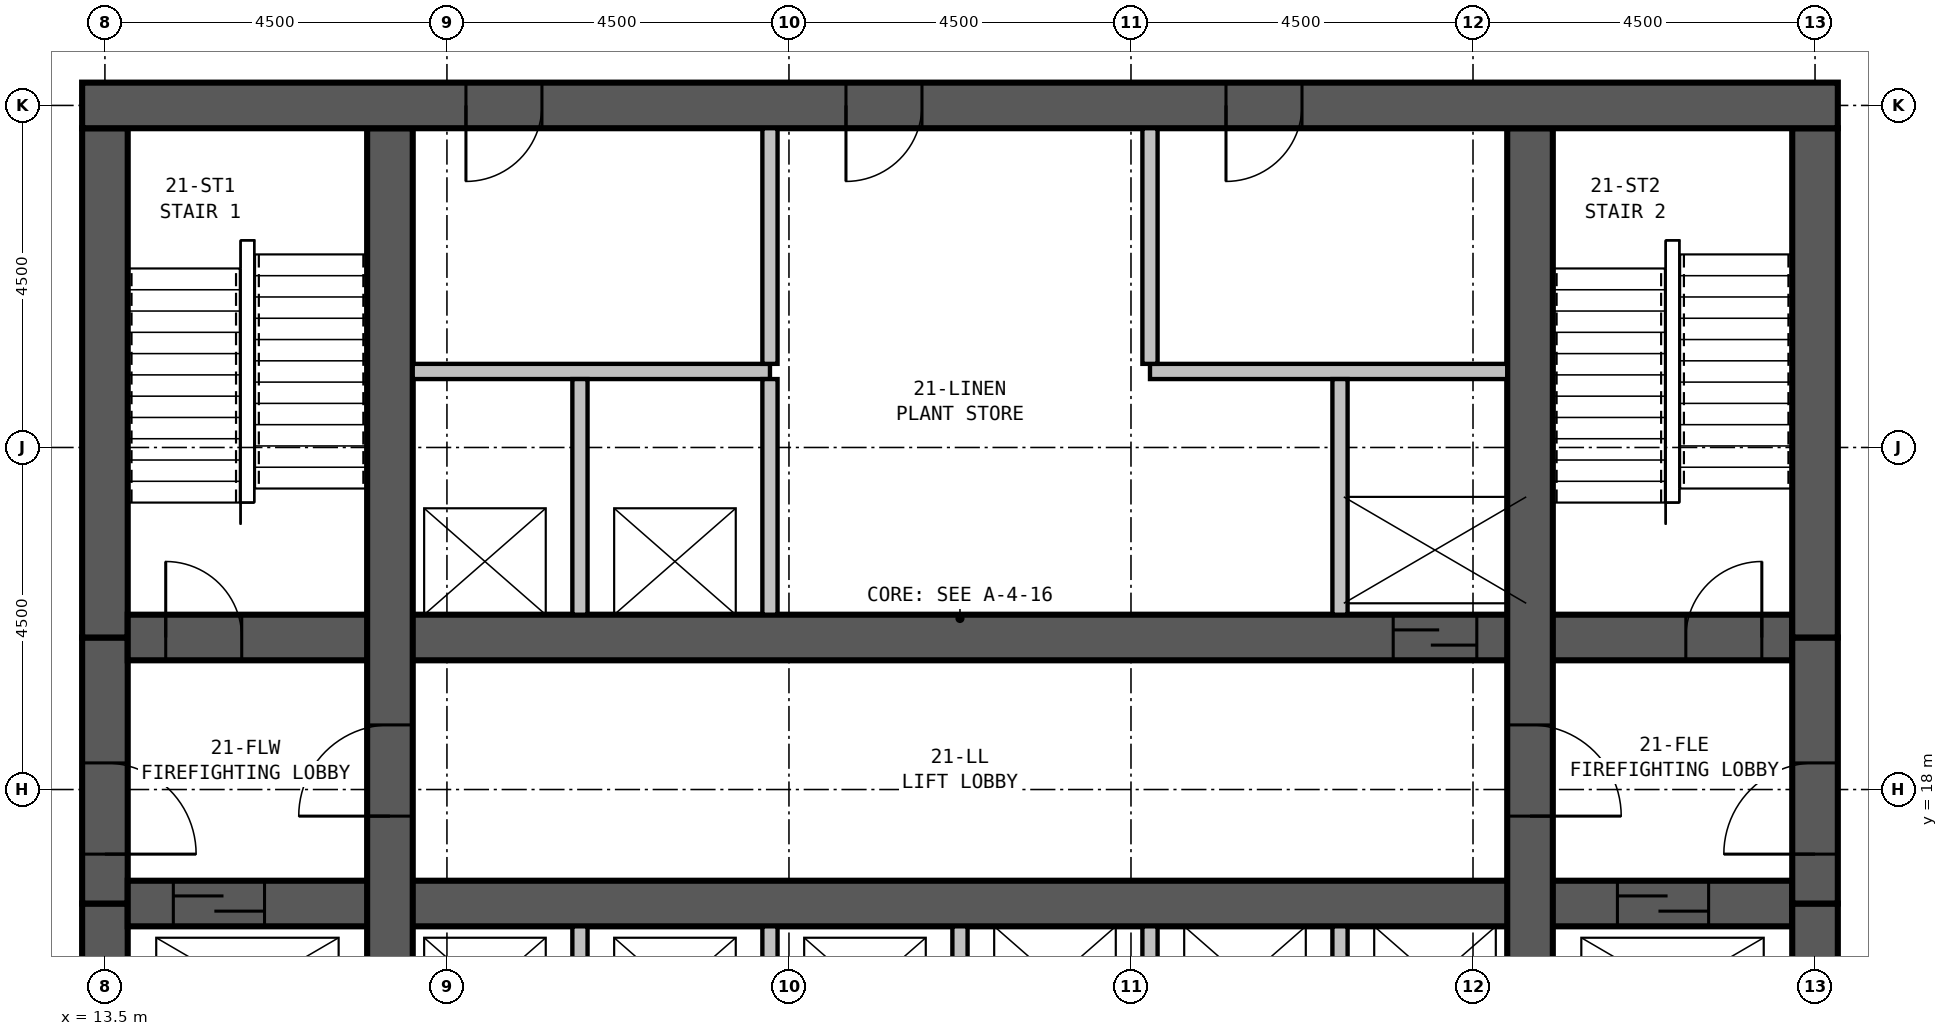
"""IFC4 building model, lengths in metres.
Left out: names, types, materials, properties, quantities, classifications, styles, units other than length and angle.
Written with IfcOpenShell. Run it as: python <this file> out.ifc"""

import sys

from ifc_helpers import new_model, si_unit, direction, frame, frame_2d, origin, place, context, subcontext, project, spatial, rectangle, extrude, element, fill, save


model = new_model("IFC4")
c1 = context("Model", 3, precision=1e-05, world=origin(), true_north=direction((0.0, 1.0)))
c2 = subcontext(c1, "Body", "Model", "MODEL_VIEW")
j1 = project(units=[si_unit("LENGTHUNIT", "METRE"), si_unit("PLANEANGLEUNIT", "RADIAN")], contexts=[c1])
p1 = place(None, origin())
s1 = spatial("IfcSite", under=j1, at=p1, CompositionType="ELEMENT")
p2 = place(p1, origin())
s2 = spatial("IfcBuilding", under=s1, at=p2, CompositionType="ELEMENT")
p3 = place(p2, frame((0.0, 0.0, 85.7)))
s3 = spatial("IfcBuildingStorey", under=s2, at=p3, CompositionType="ELEMENT", Elevation=85.7)
p4 = place(p3, frame((36.3, 27.0, 0.0), z_axis=(0.0, 0.0, 1.0), x_axis=(-1.0, 0.0, 0.0)))
e1 = element("IfcWall", 1, at=p4, inside=s3, PredefinedType="SHEAR", context=c2, shape_type="SweptSolid", body=[
    extrude(rectangle(XDim=23.1, YDim=0.6, at=frame_2d((11.55, 0.0))), origin(), (0.0, 0.0, 1.0), 4.2),
])
p5 = place(p4, frame((17.05, 0.0, 0.0)))
e2 = element("IfcOpeningElement", 2, at=p5, cuts=e1, PredefinedType="OPENING", context=c2, shape_type="SweptSolid", body=[
    extrude(rectangle(XDim=1.0, YDim=2.1, at=frame_2d((0.5, 1.05))), frame((0.0, 0.31, 0.0), z_axis=(0.0, -1.0, 0.0), x_axis=(1.0, 0.0, 0.0)), (0.0, 0.0, 1.0), 0.62),
])
p6 = place(p4, frame((12.05, 0.0, 0.0)))
e3 = element("IfcOpeningElement", 3, at=p6, cuts=e1, PredefinedType="OPENING", context=c2, shape_type="SweptSolid", body=[
    extrude(rectangle(XDim=1.0, YDim=2.1, at=frame_2d((0.5, 1.05))), frame((0.0, 0.31, 0.0), z_axis=(0.0, -1.0, 0.0), x_axis=(1.0, 0.0, 0.0)), (0.0, 0.0, 1.0), 0.62),
])
p7 = place(p4, frame((7.05, 0.0, 0.0)))
e4 = element("IfcOpeningElement", 4, at=p7, cuts=e1, PredefinedType="OPENING", context=c2, shape_type="SweptSolid", body=[
    extrude(rectangle(XDim=1.0, YDim=2.1, at=frame_2d((0.5, 1.05))), frame((0.0, 0.31, 0.0), z_axis=(0.0, -1.0, 0.0), x_axis=(1.0, 0.0, 0.0)), (0.0, 0.0, 1.0), 0.62),
])
p8 = place(p3, frame((17.25, 13.8, 0.0), z_axis=(0.0, 0.0, 1.0), x_axis=(0.0, 1.0, 0.0)))
e5 = element("IfcWall", 5, at=p8, inside=s3, PredefinedType="SHEAR", context=c2, shape_type="SweptSolid", body=[
    extrude(rectangle(XDim=12.9, YDim=0.6, at=frame_2d((6.45, 0.0))), origin(), (0.0, 0.0, 1.0), 4.2),
])
p9 = place(p8, frame((3.85, 0.0, 0.0)))
e6 = element("IfcOpeningElement", 6, at=p9, cuts=e5, PredefinedType="OPENING", context=c2, shape_type="SweptSolid", body=[
    extrude(rectangle(XDim=1.2, YDim=2.1, at=frame_2d((0.6, 1.05))), frame((0.0, 0.31, 0.0), z_axis=(0.0, -1.0, 0.0), x_axis=(1.0, 0.0, 0.0)), (0.0, 0.0, 1.0), 0.62),
])
p10 = place(p3, frame((32.25, 13.8, 0.0), z_axis=(0.0, 0.0, 1.0), x_axis=(0.0, 1.0, 0.0)))
e7 = element("IfcWall", 7, at=p10, inside=s3, PredefinedType="SHEAR", context=c2, shape_type="SweptSolid", body=[
    extrude(rectangle(XDim=12.9, YDim=0.6, at=frame_2d((6.45, 0.0))), origin(), (0.0, 0.0, 1.0), 4.2),
])
p11 = place(p10, frame((5.05, 0.0, 0.0), z_axis=(0.0, 0.0, 1.0), x_axis=(-1.0, 0.0, 0.0)))
e8 = element("IfcOpeningElement", 8, at=p11, cuts=e7, PredefinedType="OPENING", context=c2, shape_type="SweptSolid", body=[
    extrude(rectangle(XDim=1.2, YDim=2.1, at=frame_2d((0.6, 1.05))), frame((0.0, 0.31, 0.0), z_axis=(0.0, -1.0, 0.0), x_axis=(1.0, 0.0, 0.0)), (0.0, 0.0, 1.0), 0.62),
])
p12 = place(p3, frame((13.8, 16.5, 0.0), z_axis=(0.0, 0.0, 1.0), x_axis=(1.0, 0.0, 0.0)))
e9 = element("IfcWall", 9, at=p12, inside=s3, PredefinedType="SHEAR", context=c2, shape_type="SweptSolid", body=[
    extrude(rectangle(XDim=21.9, YDim=0.6, at=frame_2d((10.95, 0.0))), origin(), (0.0, 0.0, 1.0), 4.2),
])
p13 = place(p12, frame((0.6, 0.0, 0.0)))
e10 = element("IfcOpeningElement", 10, at=p13, cuts=e9, PredefinedType="OPENING", context=c2, shape_type="SweptSolid", body=[
    extrude(rectangle(XDim=1.2, YDim=2.1, at=frame_2d((0.6, 1.05))), frame((0.0, 0.31, 0.0), z_axis=(0.0, -1.0, 0.0), x_axis=(1.0, 0.0, 0.0)), (0.0, 0.0, 1.0), 0.62),
])
p14 = place(p12, frame((19.6, 0.0, 0.0)))
e11 = element("IfcOpeningElement", 11, at=p14, cuts=e9, PredefinedType="OPENING", context=c2, shape_type="SweptSolid", body=[
    extrude(rectangle(XDim=1.2, YDim=2.1, at=frame_2d((0.6, 1.05))), frame((0.0, 0.31, 0.0), z_axis=(0.0, -1.0, 0.0), x_axis=(1.0, 0.0, 0.0)), (0.0, 0.0, 1.0), 0.62),
])
p15 = place(p3, frame((13.8, 20.0, 0.0), z_axis=(0.0, 0.0, 1.0), x_axis=(1.0, 0.0, 0.0)))
e12 = element("IfcWall", 12, at=p15, inside=s3, PredefinedType="SHEAR", context=c2, shape_type="SweptSolid", body=[
    extrude(rectangle(XDim=21.9, YDim=0.6, at=frame_2d((10.95, 0.0))), origin(), (0.0, 0.0, 1.0), 4.2),
])
p16 = place(p15, frame((0.5, 0.0, 0.0)))
e13 = element("IfcOpeningElement", 13, at=p16, cuts=e12, PredefinedType="OPENING", context=c2, shape_type="SweptSolid", body=[
    extrude(rectangle(XDim=1.0, YDim=2.1, at=frame_2d((0.5, 1.05))), frame((0.0, 0.31, 0.0), z_axis=(0.0, -1.0, 0.0), x_axis=(1.0, 0.0, 0.0)), (0.0, 0.0, 1.0), 0.62),
])
p17 = place(p15, frame((20.5, 0.0, 0.0)))
e14 = element("IfcOpeningElement", 14, at=p17, cuts=e12, PredefinedType="OPENING", context=c2, shape_type="SweptSolid", body=[
    extrude(rectangle(XDim=1.0, YDim=2.1, at=frame_2d((0.5, 1.05))), frame((0.0, 0.31, 0.0), z_axis=(0.0, -1.0, 0.0), x_axis=(1.0, 0.0, 0.0)), (0.0, 0.0, 1.0), 0.62),
])
p18 = place(p15, frame((16.65, 0.0, 0.0)))
e15 = element("IfcOpeningElement", 15, at=p18, cuts=e12, PredefinedType="OPENING", context=c2, shape_type="SweptSolid", body=[
    extrude(rectangle(XDim=1.1, YDim=2.1, at=frame_2d((0.55, 1.05))), frame((0.0, 0.31, 0.0), z_axis=(0.0, -1.0, 0.0), x_axis=(1.0, 0.0, 0.0)), (0.0, 0.0, 1.0), 0.62),
])
p19 = place(p3, frame((13.5, 26.7, 0.0), z_axis=(0.0, 0.0, 1.0), x_axis=(0.0, -1.0, 0.0)))
e16 = element("IfcWall", 16, at=p19, inside=s3, PredefinedType="SHEAR", context=c2, shape_type="SweptSolid", body=[
    extrude(rectangle(XDim=6.7, YDim=0.6, at=frame_2d((3.35, 0.0))), origin(), (0.0, 0.0, 1.0), 4.2),
])
p20 = place(p3, frame((13.5, 20.0, 0.0), z_axis=(0.0, 0.0, 1.0), x_axis=(0.0, -1.0, 0.0)))
e17 = element("IfcWall", 17, at=p20, inside=s3, PredefinedType="SHEAR", context=c2, shape_type="SweptSolid", body=[
    extrude(rectangle(XDim=3.5, YDim=0.6, at=frame_2d((1.75, 0.0))), origin(), (0.0, 0.0, 1.0), 4.2),
])
p21 = place(p20, frame((1.65, 0.0, 0.0)))
e18 = element("IfcOpeningElement", 18, at=p21, cuts=e17, PredefinedType="OPENING", context=c2, shape_type="SweptSolid", body=[
    extrude(rectangle(XDim=1.2, YDim=2.1, at=frame_2d((0.6, 1.05))), frame((0.0, 0.31, 0.0), z_axis=(0.0, -1.0, 0.0), x_axis=(1.0, 0.0, 0.0)), (0.0, 0.0, 1.0), 0.62),
])
for number, where, z_axis, x_axis in (
    (19, (13.5, 16.5, 0.0), (0.0, 0.0, 1.0), (0.0, -1.0, 0.0)),
    (20, (36.0, 13.8, 0.0), (0.0, 0.0, 1.0), (0.0, 1.0, 0.0)),
):
    element("IfcWall", number, at=place(p3, frame(where, z_axis=z_axis, x_axis=x_axis)), inside=s3, PredefinedType="SHEAR", context=c2, shape_type="SweptSolid", body=[
        extrude(rectangle(XDim=2.7, YDim=0.6, at=frame_2d((1.35, 0.0))), origin(), (0.0, 0.0, 1.0), 4.2),
    ])
p22 = place(p3, frame((36.0, 16.5, 0.0), z_axis=(0.0, 0.0, 1.0), x_axis=(0.0, 1.0, 0.0)))
e21 = element("IfcWall", 21, at=p22, inside=s3, PredefinedType="SHEAR", context=c2, shape_type="SweptSolid", body=[
    extrude(rectangle(XDim=3.5, YDim=0.6, at=frame_2d((1.75, 0.0))), origin(), (0.0, 0.0, 1.0), 4.2),
])
p23 = place(p22, frame((0.65, 0.0, 0.0)))
e22 = element("IfcOpeningElement", 22, at=p23, cuts=e21, PredefinedType="OPENING", context=c2, shape_type="SweptSolid", body=[
    extrude(rectangle(XDim=1.2, YDim=2.1, at=frame_2d((0.6, 1.05))), frame((0.0, 0.31, 0.0), z_axis=(0.0, -1.0, 0.0), x_axis=(1.0, 0.0, 0.0)), (0.0, 0.0, 1.0), 0.62),
])
p24 = place(p3, frame((36.0, 20.0, 0.0), z_axis=(0.0, 0.0, 1.0), x_axis=(0.0, 1.0, 0.0)))
e23 = element("IfcWall", 23, at=p24, inside=s3, PredefinedType="SHEAR", context=c2, shape_type="SweptSolid", body=[
    extrude(rectangle(XDim=6.7, YDim=0.6, at=frame_2d((3.35, 0.0))), origin(), (0.0, 0.0, 1.0), 4.2),
])
p25 = place(p3, frame((19.75, 13.8, 0.0), z_axis=(0.0, 0.0, 1.0), x_axis=(0.0, 1.0, 0.0)))
e24 = element("IfcWall", 24, at=p25, inside=s3, PredefinedType="PARTITIONING", context=c2, shape_type="SweptSolid", body=[
    extrude(rectangle(XDim=2.4, YDim=0.2, at=frame_2d((1.2, 0.0))), origin(), (0.0, 0.0, 1.0), 3.95),
])
p26 = place(p3, frame((19.75, 20.3, 0.0), z_axis=(0.0, 0.0, 1.0), x_axis=(0.0, 1.0, 0.0)))
e25 = element("IfcWall", 25, at=p26, inside=s3, PredefinedType="PARTITIONING", context=c2, shape_type="SweptSolid", body=[
    extrude(rectangle(XDim=3.1, YDim=0.2, at=frame_2d((1.55, 0.0))), origin(), (0.0, 0.0, 1.0), 3.95),
])
p27 = place(p3, frame((22.25, 13.8, 0.0), z_axis=(0.0, 0.0, 1.0), x_axis=(0.0, 1.0, 0.0)))
e26 = element("IfcWall", 26, at=p27, inside=s3, PredefinedType="PARTITIONING", context=c2, shape_type="SweptSolid", body=[
    extrude(rectangle(XDim=2.4, YDim=0.2, at=frame_2d((1.2, 0.0))), origin(), (0.0, 0.0, 1.0), 3.95),
])
p28 = place(p3, frame((22.25, 20.3, 0.0), z_axis=(0.0, 0.0, 1.0), x_axis=(0.0, 1.0, 0.0)))
e27 = element("IfcWall", 27, at=p28, inside=s3, PredefinedType="PARTITIONING", context=c2, shape_type="SweptSolid", body=[
    extrude(rectangle(XDim=3.1, YDim=0.2, at=frame_2d((1.55, 0.0))), origin(), (0.0, 0.0, 1.0), 3.95),
])
for number, where, z_axis, x_axis in (
    (28, (24.75, 13.8, 0.0), (0.0, 0.0, 1.0), (0.0, 1.0, 0.0)),
    (29, (27.25, 13.8, 0.0), (0.0, 0.0, 1.0), (0.0, 1.0, 0.0)),
    (30, (29.75, 13.8, 0.0), (0.0, 0.0, 1.0), (0.0, 1.0, 0.0)),
):
    element("IfcWall", number, at=place(p3, frame(where, z_axis=z_axis, x_axis=x_axis)), inside=s3, PredefinedType="PARTITIONING", context=c2, shape_type="SweptSolid", body=[
        extrude(rectangle(XDim=2.4, YDim=0.2, at=frame_2d((1.2, 0.0))), origin(), (0.0, 0.0, 1.0), 3.95),
    ])
p29 = place(p3, frame((29.75, 20.3, 0.0), z_axis=(0.0, 0.0, 1.0), x_axis=(0.0, 1.0, 0.0)))
e31 = element("IfcWall", 31, at=p29, inside=s3, PredefinedType="PARTITIONING", context=c2, shape_type="SweptSolid", body=[
    extrude(rectangle(XDim=3.1, YDim=0.2, at=frame_2d((1.55, 0.0))), origin(), (0.0, 0.0, 1.0), 3.95),
])
for number, where, z_axis, x_axis in (
    (32, (17.55, 23.5, 0.0), (0.0, 0.0, 1.0), (1.0, 0.0, 0.0)),
    (33, (27.25, 23.5, 0.0), (0.0, 0.0, 1.0), (1.0, 0.0, 0.0)),
):
    element("IfcWall", number, at=place(p3, frame(where, z_axis=z_axis, x_axis=x_axis)), inside=s3, PredefinedType="PARTITIONING", context=c2, shape_type="SweptSolid", body=[
        extrude(rectangle(XDim=4.7, YDim=0.2, at=frame_2d((2.35, 0.0))), origin(), (0.0, 0.0, 1.0), 3.95),
    ])
for number, where, z_axis, x_axis in (
    (34, (22.25, 23.6, 0.0), (0.0, 0.0, 1.0), (0.0, 1.0, 0.0)),
    (35, (27.25, 23.6, 0.0), (0.0, 0.0, 1.0), (0.0, 1.0, 0.0)),
):
    element("IfcWall", number, at=place(p3, frame(where, z_axis=z_axis, x_axis=x_axis)), inside=s3, PredefinedType="PARTITIONING", context=c2, shape_type="SweptSolid", body=[
        extrude(rectangle(XDim=3.1, YDim=0.2, at=frame_2d((1.55, 0.0))), origin(), (0.0, 0.0, 1.0), 3.95),
    ])
p30 = place(p21, origin())
e36 = element("IfcDoor", 36, at=p30, inside=s3, OperationType="SINGLE_SWING_RIGHT", PredefinedType="DOOR", context=c2, shape_type="SweptSolid", body=[
    extrude(rectangle(XDim=1.2, YDim=2.1, at=frame_2d((0.6, 1.05))), frame((0.0, 0.3, 0.0), z_axis=(0.0, -1.0, 0.0), x_axis=(1.0, 0.0, 0.0)), (0.0, 0.0, 1.0), 0.6),
])
fill(e18, e36)
p31 = place(p23, origin())
e37 = element("IfcDoor", 37, at=p31, inside=s3, OperationType="SINGLE_SWING_LEFT", PredefinedType="DOOR", context=c2, shape_type="SweptSolid", body=[
    extrude(rectangle(XDim=1.2, YDim=2.1, at=frame_2d((0.6, 1.05))), frame((0.0, 0.3, 0.0), z_axis=(0.0, -1.0, 0.0), x_axis=(1.0, 0.0, 0.0)), (0.0, 0.0, 1.0), 0.6),
])
fill(e22, e37)
p32 = place(p9, origin())
e38 = element("IfcDoor", 38, at=p32, inside=s3, OperationType="SINGLE_SWING_LEFT", PredefinedType="DOOR", context=c2, shape_type="SweptSolid", body=[
    extrude(rectangle(XDim=1.2, YDim=2.1, at=frame_2d((0.6, 1.05))), frame((0.0, 0.3, 0.0), z_axis=(0.0, -1.0, 0.0), x_axis=(1.0, 0.0, 0.0)), (0.0, 0.0, 1.0), 0.6),
])
fill(e6, e38)
p33 = place(p11, origin())
e39 = element("IfcDoor", 39, at=p33, inside=s3, OperationType="SINGLE_SWING_RIGHT", PredefinedType="DOOR", context=c2, shape_type="SweptSolid", body=[
    extrude(rectangle(XDim=1.2, YDim=2.1, at=frame_2d((0.6, 1.05))), frame((0.0, 0.3, 0.0), z_axis=(0.0, -1.0, 0.0), x_axis=(1.0, 0.0, 0.0)), (0.0, 0.0, 1.0), 0.6),
])
fill(e8, e39)
p34 = place(p16, origin())
e40 = element("IfcDoor", 40, at=p34, inside=s3, OperationType="SINGLE_SWING_LEFT", PredefinedType="DOOR", context=c2, shape_type="SweptSolid", body=[
    extrude(rectangle(XDim=1.0, YDim=2.1, at=frame_2d((0.5, 1.05))), frame((0.0, 0.3, 0.0), z_axis=(0.0, -1.0, 0.0), x_axis=(1.0, 0.0, 0.0)), (0.0, 0.0, 1.0), 0.6),
])
fill(e13, e40)
p35 = place(p17, origin())
e41 = element("IfcDoor", 41, at=p35, inside=s3, OperationType="SINGLE_SWING_RIGHT", PredefinedType="DOOR", context=c2, shape_type="SweptSolid", body=[
    extrude(rectangle(XDim=1.0, YDim=2.1, at=frame_2d((0.5, 1.05))), frame((0.0, 0.3, 0.0), z_axis=(0.0, -1.0, 0.0), x_axis=(1.0, 0.0, 0.0)), (0.0, 0.0, 1.0), 0.6),
])
fill(e14, e41)
p36 = place(p18, origin())
e42 = element("IfcDoor", 42, at=p36, inside=s3, OperationType="SLIDING_TO_LEFT", PredefinedType="DOOR", context=c2, shape_type="SweptSolid", body=[
    extrude(rectangle(XDim=1.1, YDim=2.1, at=frame_2d((0.55, 1.05))), frame((0.0, 0.3, 0.0), z_axis=(0.0, -1.0, 0.0), x_axis=(1.0, 0.0, 0.0)), (0.0, 0.0, 1.0), 0.6),
])
fill(e15, e42)
p37 = place(p13, origin())
e43 = element("IfcDoor", 43, at=p37, inside=s3, OperationType="SLIDING_TO_LEFT", PredefinedType="DOOR", context=c2, shape_type="SweptSolid", body=[
    extrude(rectangle(XDim=1.2, YDim=2.1, at=frame_2d((0.6, 1.05))), frame((0.0, 0.3, 0.0), z_axis=(0.0, -1.0, 0.0), x_axis=(1.0, 0.0, 0.0)), (0.0, 0.0, 1.0), 0.6),
])
fill(e10, e43)
p38 = place(p14, origin())
e44 = element("IfcDoor", 44, at=p38, inside=s3, OperationType="SLIDING_TO_LEFT", PredefinedType="DOOR", context=c2, shape_type="SweptSolid", body=[
    extrude(rectangle(XDim=1.2, YDim=2.1, at=frame_2d((0.6, 1.05))), frame((0.0, 0.3, 0.0), z_axis=(0.0, -1.0, 0.0), x_axis=(1.0, 0.0, 0.0)), (0.0, 0.0, 1.0), 0.6),
])
fill(e11, e44)
p39 = place(p5, origin())
e45 = element("IfcDoor", 45, at=p39, inside=s3, OperationType="SINGLE_SWING_RIGHT", PredefinedType="DOOR", context=c2, shape_type="SweptSolid", body=[
    extrude(rectangle(XDim=1.0, YDim=2.1, at=frame_2d((0.5, 1.05))), frame((0.0, 0.3, 0.0), z_axis=(0.0, -1.0, 0.0), x_axis=(1.0, 0.0, 0.0)), (0.0, 0.0, 1.0), 0.6),
])
fill(e2, e45)
p40 = place(p6, origin())
e46 = element("IfcDoor", 46, at=p40, inside=s3, OperationType="SINGLE_SWING_RIGHT", PredefinedType="DOOR", context=c2, shape_type="SweptSolid", body=[
    extrude(rectangle(XDim=1.0, YDim=2.1, at=frame_2d((0.5, 1.05))), frame((0.0, 0.3, 0.0), z_axis=(0.0, -1.0, 0.0), x_axis=(1.0, 0.0, 0.0)), (0.0, 0.0, 1.0), 0.6),
])
fill(e3, e46)
p41 = place(p7, origin())
e47 = element("IfcDoor", 47, at=p41, inside=s3, OperationType="SINGLE_SWING_RIGHT", PredefinedType="DOOR", context=c2, shape_type="SweptSolid", body=[
    extrude(rectangle(XDim=1.0, YDim=2.1, at=frame_2d((0.5, 1.05))), frame((0.0, 0.3, 0.0), z_axis=(0.0, -1.0, 0.0), x_axis=(1.0, 0.0, 0.0)), (0.0, 0.0, 1.0), 0.6),
])
fill(e4, e47)
save(model, sys.argv[1])
